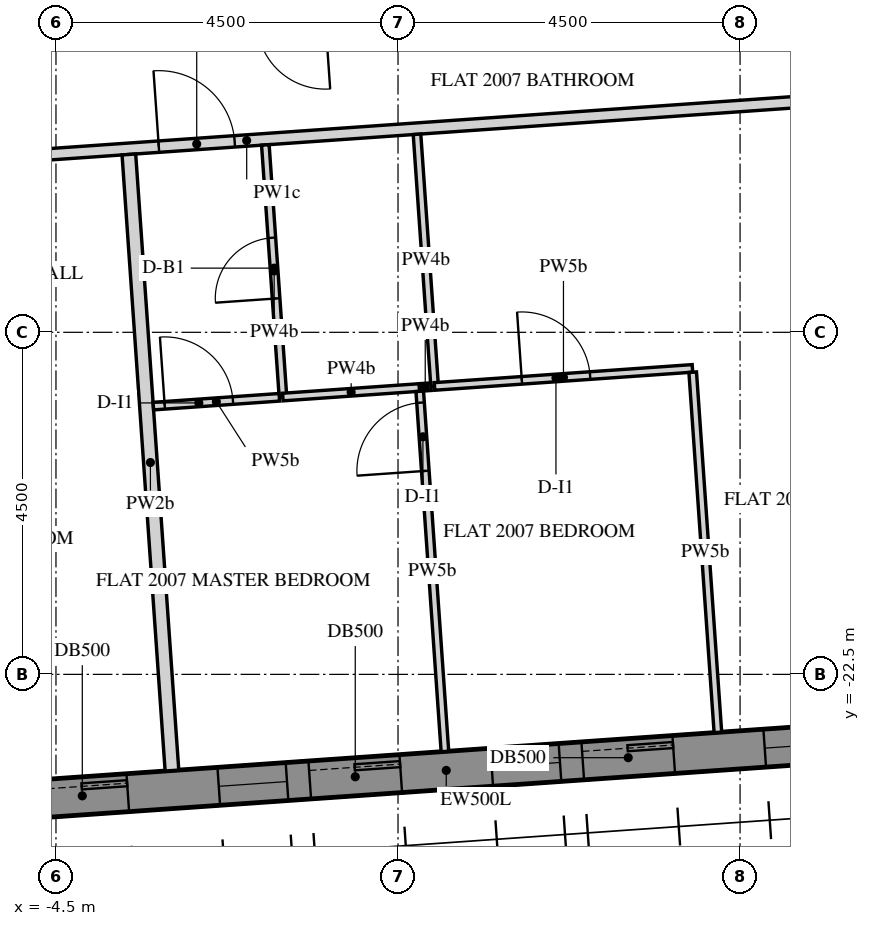
"""IFC4 building model, lengths in metres.
Left out: names, types, materials, properties, quantities, classifications, styles, units other than length and angle.
Written with IfcOpenShell. Run it as: python <this file> out.ifc"""

import sys

from ifc_helpers import new_model, si_unit, direction, frame, frame_2d, origin, place, context, subcontext, project, spatial, polyline, rectangle, outline, extrude, element, fill, save


model = new_model("IFC4")
c1 = context("Model", 3, precision=1e-05, world=origin(), true_north=direction((0.0, 1.0)))
c2 = subcontext(c1, "Body", "Model", "MODEL_VIEW")
j1 = project(units=[si_unit("LENGTHUNIT", "METRE"), si_unit("PLANEANGLEUNIT", "RADIAN")], contexts=[c1])
p1 = place(None, origin())
s1 = spatial("IfcSite", under=j1, at=p1, CompositionType="ELEMENT")
p2 = place(p1, origin())
s2 = spatial("IfcBuilding", under=s1, at=p2, CompositionType="ELEMENT")
p3 = place(p2, frame((0.0, 0.0, 260.1)))
s3 = spatial("IfcBuildingStorey", under=s2, at=p3, CompositionType="ELEMENT", Elevation=260.1)
p4 = place(p3, frame((-10.86, -24.567, -0.15), z_axis=(0.0, 0.0, 1.0), x_axis=(0.997564329317, 0.06975248292, 0.0)))
e1 = element("IfcWall", 1, at=p4, inside=s3, PredefinedType="SOLIDWALL", context=c2, shape_type="SweptSolid", body=[
    extrude(outline(polyline([(0.25, -0.25), (22.795, -0.25), (23.295, 0.25), (-0.25, 0.25), (0.25, -0.25)])), origin(), (0.0, 0.0, 1.0), 3.9),
])
p5 = place(p4, frame((1.323, 0.0, 1.05)))
e2 = element("IfcOpeningElement", 2, at=p5, cuts=e1, PredefinedType="OPENING", context=c2, shape_type="SweptSolid", body=[
    extrude(rectangle(XDim=0.9, YDim=1.5, at=frame_2d((0.45, 0.75))), frame((0.0, 0.26, 0.0), z_axis=(0.0, -1.0, 0.0), x_axis=(1.0, 0.0, 0.0)), (0.0, 0.0, 1.0), 0.52),
])
p6 = place(p4, frame((2.522, 0.0, 0.15)))
e3 = element("IfcOpeningElement", 3, at=p6, cuts=e1, PredefinedType="OPENING", context=c2, shape_type="SweptSolid", body=[
    extrude(rectangle(XDim=1.2, YDim=2.4, at=frame_2d((0.6, 1.2))), frame((0.0, 0.26, 0.0), z_axis=(0.0, -1.0, 0.0), x_axis=(1.0, 0.0, 0.0)), (0.0, 0.0, 1.0), 0.52),
])
p7 = place(p4, frame((4.922, 0.0, 1.05)))
e4 = element("IfcOpeningElement", 4, at=p7, cuts=e1, PredefinedType="OPENING", context=c2, shape_type="SweptSolid", body=[
    extrude(rectangle(XDim=0.9, YDim=1.5, at=frame_2d((0.45, 0.75))), frame((0.0, 0.26, 0.0), z_axis=(0.0, -1.0, 0.0), x_axis=(1.0, 0.0, 0.0)), (0.0, 0.0, 1.0), 0.52),
])
p8 = place(p4, frame((6.122, 0.0, 0.15)))
e5 = element("IfcOpeningElement", 5, at=p8, cuts=e1, PredefinedType="OPENING", context=c2, shape_type="SweptSolid", body=[
    extrude(rectangle(XDim=1.2, YDim=2.4, at=frame_2d((0.6, 1.2))), frame((0.0, 0.26, 0.0), z_axis=(0.0, -1.0, 0.0), x_axis=(1.0, 0.0, 0.0)), (0.0, 0.0, 1.0), 0.52),
])
p9 = place(p4, frame((8.522, 0.0, 1.05)))
e6 = element("IfcOpeningElement", 6, at=p9, cuts=e1, PredefinedType="OPENING", context=c2, shape_type="SweptSolid", body=[
    extrude(rectangle(XDim=0.9, YDim=1.5, at=frame_2d((0.45, 0.75))), frame((0.0, 0.26, 0.0), z_axis=(0.0, -1.0, 0.0), x_axis=(1.0, 0.0, 0.0)), (0.0, 0.0, 1.0), 0.52),
])
p10 = place(p4, frame((9.722, 0.0, 0.15)))
e7 = element("IfcOpeningElement", 7, at=p10, cuts=e1, PredefinedType="OPENING", context=c2, shape_type="SweptSolid", body=[
    extrude(rectangle(XDim=1.2, YDim=2.4, at=frame_2d((0.6, 1.2))), frame((0.0, 0.26, 0.0), z_axis=(0.0, -1.0, 0.0), x_axis=(1.0, 0.0, 0.0)), (0.0, 0.0, 1.0), 0.52),
])
p11 = place(p4, frame((12.122, 0.0, 1.05)))
e8 = element("IfcOpeningElement", 8, at=p11, cuts=e1, PredefinedType="OPENING", context=c2, shape_type="SweptSolid", body=[
    extrude(rectangle(XDim=0.9, YDim=1.5, at=frame_2d((0.45, 0.75))), frame((0.0, 0.26, 0.0), z_axis=(0.0, -1.0, 0.0), x_axis=(1.0, 0.0, 0.0)), (0.0, 0.0, 1.0), 0.52),
])
p12 = place(p4, frame((13.323, 0.0, 0.15)))
e9 = element("IfcOpeningElement", 9, at=p12, cuts=e1, PredefinedType="OPENING", context=c2, shape_type="SweptSolid", body=[
    extrude(rectangle(XDim=1.2, YDim=2.4, at=frame_2d((0.6, 1.2))), frame((0.0, 0.26, 0.0), z_axis=(0.0, -1.0, 0.0), x_axis=(1.0, 0.0, 0.0)), (0.0, 0.0, 1.0), 0.52),
])
p13 = place(p4, frame((15.722, 0.0, 1.05)))
e10 = element("IfcOpeningElement", 10, at=p13, cuts=e1, PredefinedType="OPENING", context=c2, shape_type="SweptSolid", body=[
    extrude(rectangle(XDim=0.9, YDim=1.5, at=frame_2d((0.45, 0.75))), frame((0.0, 0.26, 0.0), z_axis=(0.0, -1.0, 0.0), x_axis=(1.0, 0.0, 0.0)), (0.0, 0.0, 1.0), 0.52),
])
p14 = place(p4, frame((16.922, 0.0, 0.15)))
e11 = element("IfcOpeningElement", 11, at=p14, cuts=e1, PredefinedType="OPENING", context=c2, shape_type="SweptSolid", body=[
    extrude(rectangle(XDim=1.2, YDim=2.4, at=frame_2d((0.6, 1.2))), frame((0.0, 0.26, 0.0), z_axis=(0.0, -1.0, 0.0), x_axis=(1.0, 0.0, 0.0)), (0.0, 0.0, 1.0), 0.52),
])
p15 = place(p4, frame((19.323, 0.0, 1.05)))
e12 = element("IfcOpeningElement", 12, at=p15, cuts=e1, PredefinedType="OPENING", context=c2, shape_type="SweptSolid", body=[
    extrude(rectangle(XDim=0.9, YDim=1.5, at=frame_2d((0.45, 0.75))), frame((0.0, 0.26, 0.0), z_axis=(0.0, -1.0, 0.0), x_axis=(1.0, 0.0, 0.0)), (0.0, 0.0, 1.0), 0.52),
])
p16 = place(p4, frame((20.522, 0.0, 0.15)))
e13 = element("IfcOpeningElement", 13, at=p16, cuts=e1, PredefinedType="OPENING", context=c2, shape_type="SweptSolid", body=[
    extrude(rectangle(XDim=1.2, YDim=2.4, at=frame_2d((0.6, 1.2))), frame((0.0, 0.26, 0.0), z_axis=(0.0, -1.0, 0.0), x_axis=(1.0, 0.0, 0.0)), (0.0, 0.0, 1.0), 0.52),
])
p17 = place(p3, frame((-10.606, -16.079, 0.0), z_axis=(0.0, 0.0, 1.0), x_axis=(0.997563356349, 0.069766396426, 0.0)))
e14 = element("IfcWall", 14, at=p17, inside=s3, PredefinedType="PARTITIONING", context=c2, shape_type="SweptSolid", body=[
    extrude(rectangle(XDim=17.273, YDim=0.15, at=frame_2d((8.636, 0.0))), origin(), (0.0, 0.0, 1.0), 2.823),
])
p18 = place(p17, frame((7.478, 0.0, 0.0)))
e15 = element("IfcOpeningElement", 15, at=p18, cuts=e14, PredefinedType="OPENING", context=c2, shape_type="SweptSolid", body=[
    extrude(rectangle(XDim=1.0, YDim=2.1, at=frame_2d((0.5, 1.05))), frame((0.0, 0.085, 0.0), z_axis=(0.0, -1.0, 0.0), x_axis=(1.0, 0.0, 0.0)), (0.0, 0.0, 1.0), 0.17),
])
p19 = place(p3, frame((7.051, -13.341, 0.0), z_axis=(0.0, 0.0, 1.0), x_axis=(-0.997563599815, -0.069762915103, 0.0)))
e16 = element("IfcWall", 16, at=p19, inside=s3, PredefinedType="PARTITIONING", context=c2, shape_type="SweptSolid", body=[
    extrude(rectangle(XDim=16.952, YDim=0.15, at=frame_2d((8.476, 0.0))), origin(), (0.0, 0.0, 1.0), 2.823),
])
p20 = place(p19, frame((8.026, 0.0, 0.0)))
e17 = element("IfcOpeningElement", 17, at=p20, cuts=e16, PredefinedType="OPENING", context=c2, shape_type="SweptSolid", body=[
    extrude(rectangle(XDim=0.9, YDim=2.1, at=frame_2d((0.45, 1.05))), frame((0.0, 0.085, 0.0), z_axis=(0.0, -1.0, 0.0), x_axis=(1.0, 0.0, 0.0)), (0.0, 0.0, 1.0), 0.17),
])
p21 = place(p3, frame((-2.974, -23.765, 0.0), z_axis=(0.0, 0.0, 1.0), x_axis=(-0.069771417753, 0.99756300516, 0.0)))
e18 = element("IfcWall", 18, at=p21, inside=s3, PredefinedType="PARTITIONING", context=c2, shape_type="SweptSolid", body=[
    extrude(rectangle(XDim=8.125, YDim=0.18, at=frame_2d((4.062, 0.0))), origin(), (0.0, 0.0, 1.0), 2.823),
])
p22 = place(p3, frame((0.25, -15.395, 0.0), z_axis=(0.0, 0.0, 1.0), x_axis=(0.069754598287, -0.997564181403, 0.0)))
e19 = element("IfcWall", 19, at=p22, inside=s3, PredefinedType="PARTITIONING", context=c2, shape_type="SweptSolid", body=[
    extrude(rectangle(XDim=3.325, YDim=0.1, at=frame_2d((1.663, 0.0))), origin(), (0.0, 0.0, 1.0), 2.823),
])
p23 = place(p3, frame((0.48, -18.712, 0.0), z_axis=(0.0, 0.0, 1.0), x_axis=(0.997564312984, 0.069752716511, 0.0)))
e20 = element("IfcWall", 20, at=p23, inside=s3, PredefinedType="PARTITIONING", context=c2, shape_type="SweptSolid", body=[
    extrude(rectangle(XDim=3.402, YDim=0.1, at=frame_2d((1.701, 0.0))), origin(), (0.0, 0.0, 1.0), 2.823),
])
p24 = place(p23, frame((1.152, 0.0, 0.0)))
e21 = element("IfcOpeningElement", 21, at=p24, cuts=e20, PredefinedType="OPENING", context=c2, shape_type="SweptSolid", body=[
    extrude(rectangle(XDim=0.9, YDim=2.1, at=frame_2d((0.45, 1.05))), frame((0.0, 0.06, 0.0), z_axis=(0.0, -1.0, 0.0), x_axis=(1.0, 0.0, 0.0)), (0.0, 0.0, 1.0), 0.12),
])
p25 = place(p3, frame((3.877, -18.525, 0.0), z_axis=(0.0, 0.0, 1.0), x_axis=(0.069745758817, -0.997564799463, 0.0)))
e22 = element("IfcWall", 22, at=p25, inside=s3, PredefinedType="PARTITIONING", context=c2, shape_type="SweptSolid", body=[
    extrude(rectangle(XDim=4.75, YDim=0.1, at=frame_2d((2.375, 0.0))), origin(), (0.0, 0.0, 1.0), 2.823),
])
p26 = place(p3, frame((-1.513, -18.852, 0.0), z_axis=(0.0, 0.0, 1.0), x_axis=(-0.069754598287, 0.997564181403, 0.0)))
e23 = element("IfcWall", 23, at=p26, inside=s3, PredefinedType="PARTITIONING", context=c2, shape_type="SweptSolid", body=[
    extrude(rectangle(XDim=3.325, YDim=0.1, at=frame_2d((1.663, 0.0))), origin(), (0.0, 0.0, 1.0), 2.823),
])
p27 = place(p26, frame((1.3, 0.0, 0.0)))
e24 = element("IfcOpeningElement", 24, at=p27, cuts=e23, PredefinedType="OPENING", context=c2, shape_type="SweptSolid", body=[
    extrude(rectangle(XDim=0.8, YDim=2.1, at=frame_2d((0.4, 1.05))), frame((0.0, 0.06, 0.0), z_axis=(0.0, -1.0, 0.0), x_axis=(1.0, 0.0, 0.0)), (0.0, 0.0, 1.0), 0.12),
])
p28 = place(p3, frame((-3.219, -18.971, 0.0), z_axis=(0.0, 0.0, 1.0), x_axis=(0.9975627517, 0.069775041534, 0.0)))
e25 = element("IfcWall", 25, at=p28, inside=s3, PredefinedType="PARTITIONING", context=c2, shape_type="SweptSolid", body=[
    extrude(rectangle(XDim=1.662, YDim=0.1, at=frame_2d((0.831, 0.0))), origin(), (0.0, 0.0, 1.0), 2.823),
])
p29 = place(p28, frame((0.15, 0.0, 0.0)))
e26 = element("IfcOpeningElement", 26, at=p29, cuts=e25, PredefinedType="OPENING", context=c2, shape_type="SweptSolid", body=[
    extrude(rectangle(XDim=0.9, YDim=2.1, at=frame_2d((0.45, 1.05))), frame((0.0, 0.06, 0.0), z_axis=(0.0, -1.0, 0.0), x_axis=(1.0, 0.0, 0.0)), (0.0, 0.0, 1.0), 0.12),
])
p30 = place(p3, frame((-1.515, -18.852, 0.0), z_axis=(0.0, 0.0, 1.0), x_axis=(0.997562835018, 0.069773850337, 0.0)))
e27 = element("IfcWall", 27, at=p30, inside=s3, PredefinedType="PARTITIONING", context=c2, shape_type="SweptSolid", body=[
    extrude(rectangle(XDim=1.802, YDim=0.1, at=frame_2d((0.901, 0.0))), origin(), (0.0, 0.0, 1.0), 2.823),
])
p31 = place(p3, frame((0.282, -18.726, 0.0), z_axis=(0.0, 0.0, 1.0), x_axis=(0.997611278984, 0.069077753617, 0.0)))
e28 = element("IfcWall", 28, at=p31, inside=s3, PredefinedType="PARTITIONING", context=c2, shape_type="SweptSolid", body=[
    extrude(rectangle(XDim=0.152, YDim=0.1, at=frame_2d((0.076, 0.0))), origin(), (0.0, 0.0, 1.0), 2.823),
])
p32 = place(p3, frame((0.617, -23.514, 0.0), z_axis=(0.0, 0.0, 1.0), x_axis=(-0.069749334994, 0.997564549424, 0.0)))
e29 = element("IfcWall", 29, at=p32, inside=s3, PredefinedType="PARTITIONING", context=c2, shape_type="SweptSolid", body=[
    extrude(rectangle(XDim=4.75, YDim=0.1, at=frame_2d((2.375, 0.0))), origin(), (0.0, 0.0, 1.0), 2.823),
])
p33 = place(p32, frame((3.7, 0.0, 0.0)))
e30 = element("IfcOpeningElement", 30, at=p33, cuts=e29, PredefinedType="OPENING", context=c2, shape_type="SweptSolid", body=[
    extrude(rectangle(XDim=0.9, YDim=2.1, at=frame_2d((0.45, 1.05))), frame((0.0, 0.06, 0.0), z_axis=(0.0, -1.0, 0.0), x_axis=(1.0, 0.0, 0.0)), (0.0, 0.0, 1.0), 0.12),
])
p34 = place(p8, frame((0.0, 0.175, 0.0)))
e31 = element("IfcDoor", 31, at=p34, inside=s3, OperationType="SLIDING_TO_LEFT", PredefinedType="DOOR", context=c2, shape_type="SweptSolid", body=[
    extrude(rectangle(XDim=1.2, YDim=2.4, at=frame_2d((0.6, 1.2))), frame((0.0, 0.025, 0.0), z_axis=(0.0, -1.0, 0.0), x_axis=(1.0, 0.0, 0.0)), (0.0, 0.0, 1.0), 0.05),
])
fill(e5, e31)
p35 = place(p9, frame((0.0, 0.18, 0.0)))
e32 = element("IfcWindow", 32, at=p35, inside=s3, PartitioningType="SINGLE_PANEL", PredefinedType="WINDOW", context=c2, shape_type="SweptSolid", body=[
    extrude(rectangle(XDim=0.9, YDim=1.5, at=frame_2d((0.45, 0.75))), frame((0.0, 0.03, 0.0), z_axis=(0.0, -1.0, 0.0), x_axis=(1.0, 0.0, 0.0)), (0.0, 0.0, 1.0), 0.06),
])
fill(e6, e32)
p36 = place(p10, frame((0.0, 0.175, 0.0)))
e33 = element("IfcDoor", 33, at=p36, inside=s3, OperationType="SLIDING_TO_LEFT", PredefinedType="DOOR", context=c2, shape_type="SweptSolid", body=[
    extrude(rectangle(XDim=1.2, YDim=2.4, at=frame_2d((0.6, 1.2))), frame((0.0, 0.025, 0.0), z_axis=(0.0, -1.0, 0.0), x_axis=(1.0, 0.0, 0.0)), (0.0, 0.0, 1.0), 0.05),
])
fill(e7, e33)
p37 = place(p11, frame((0.0, 0.18, 0.0)))
e34 = element("IfcWindow", 34, at=p37, inside=s3, PartitioningType="SINGLE_PANEL", PredefinedType="WINDOW", context=c2, shape_type="SweptSolid", body=[
    extrude(rectangle(XDim=0.9, YDim=1.5, at=frame_2d((0.45, 0.75))), frame((0.0, 0.03, 0.0), z_axis=(0.0, -1.0, 0.0), x_axis=(1.0, 0.0, 0.0)), (0.0, 0.0, 1.0), 0.06),
])
fill(e8, e34)
p38 = place(p12, frame((0.0, 0.175, 0.0)))
e35 = element("IfcDoor", 35, at=p38, inside=s3, OperationType="SLIDING_TO_LEFT", PredefinedType="DOOR", context=c2, shape_type="SweptSolid", body=[
    extrude(rectangle(XDim=1.2, YDim=2.4, at=frame_2d((0.6, 1.2))), frame((0.0, 0.025, 0.0), z_axis=(0.0, -1.0, 0.0), x_axis=(1.0, 0.0, 0.0)), (0.0, 0.0, 1.0), 0.05),
])
fill(e9, e35)
p39 = place(p13, frame((0.0, 0.18, 0.0)))
e36 = element("IfcWindow", 36, at=p39, inside=s3, PartitioningType="SINGLE_PANEL", PredefinedType="WINDOW", context=c2, shape_type="SweptSolid", body=[
    extrude(rectangle(XDim=0.9, YDim=1.5, at=frame_2d((0.45, 0.75))), frame((0.0, 0.03, 0.0), z_axis=(0.0, -1.0, 0.0), x_axis=(1.0, 0.0, 0.0)), (0.0, 0.0, 1.0), 0.06),
])
fill(e10, e36)
p40 = place(p18, origin())
e37 = element("IfcDoor", 37, at=p40, inside=s3, OperationType="SINGLE_SWING_RIGHT", PredefinedType="DOOR", context=c2, shape_type="SweptSolid", body=[
    extrude(rectangle(XDim=1.0, YDim=2.1, at=frame_2d((0.5, 1.05))), frame((0.0, 0.025, 0.0), z_axis=(0.0, -1.0, 0.0), x_axis=(1.0, 0.0, 0.0)), (0.0, 0.0, 1.0), 0.05),
])
fill(e15, e37)
p41 = place(p27, origin())
e38 = element("IfcDoor", 38, at=p41, inside=s3, OperationType="SINGLE_SWING_LEFT", PredefinedType="DOOR", context=c2, shape_type="SweptSolid", body=[
    extrude(rectangle(XDim=0.8, YDim=2.1, at=frame_2d((0.4, 1.05))), frame((0.0, 0.025, 0.0), z_axis=(0.0, -1.0, 0.0), x_axis=(1.0, 0.0, 0.0)), (0.0, 0.0, 1.0), 0.05),
])
fill(e24, e38)
p42 = place(p29, origin())
e39 = element("IfcDoor", 39, at=p42, inside=s3, OperationType="SINGLE_SWING_LEFT", PredefinedType="DOOR", context=c2, shape_type="SweptSolid", body=[
    extrude(rectangle(XDim=0.9, YDim=2.1, at=frame_2d((0.45, 1.05))), frame((0.0, 0.025, 0.0), z_axis=(0.0, -1.0, 0.0), x_axis=(1.0, 0.0, 0.0)), (0.0, 0.0, 1.0), 0.05),
])
fill(e26, e39)
p43 = place(p33, origin())
e40 = element("IfcDoor", 40, at=p43, inside=s3, OperationType="SINGLE_SWING_RIGHT", PredefinedType="DOOR", context=c2, shape_type="SweptSolid", body=[
    extrude(rectangle(XDim=0.9, YDim=2.1, at=frame_2d((0.45, 1.05))), frame((0.0, 0.025, 0.0), z_axis=(0.0, -1.0, 0.0), x_axis=(1.0, 0.0, 0.0)), (0.0, 0.0, 1.0), 0.05),
])
fill(e30, e40)
p44 = place(p24, origin())
e41 = element("IfcDoor", 41, at=p44, inside=s3, OperationType="SINGLE_SWING_RIGHT", PredefinedType="DOOR", context=c2, shape_type="SweptSolid", body=[
    extrude(rectangle(XDim=0.9, YDim=2.1, at=frame_2d((0.45, 1.05))), frame((0.0, 0.025, 0.0), z_axis=(0.0, -1.0, 0.0), x_axis=(1.0, 0.0, 0.0)), (0.0, 0.0, 1.0), 0.05),
])
fill(e21, e41)
save(model, sys.argv[1])
